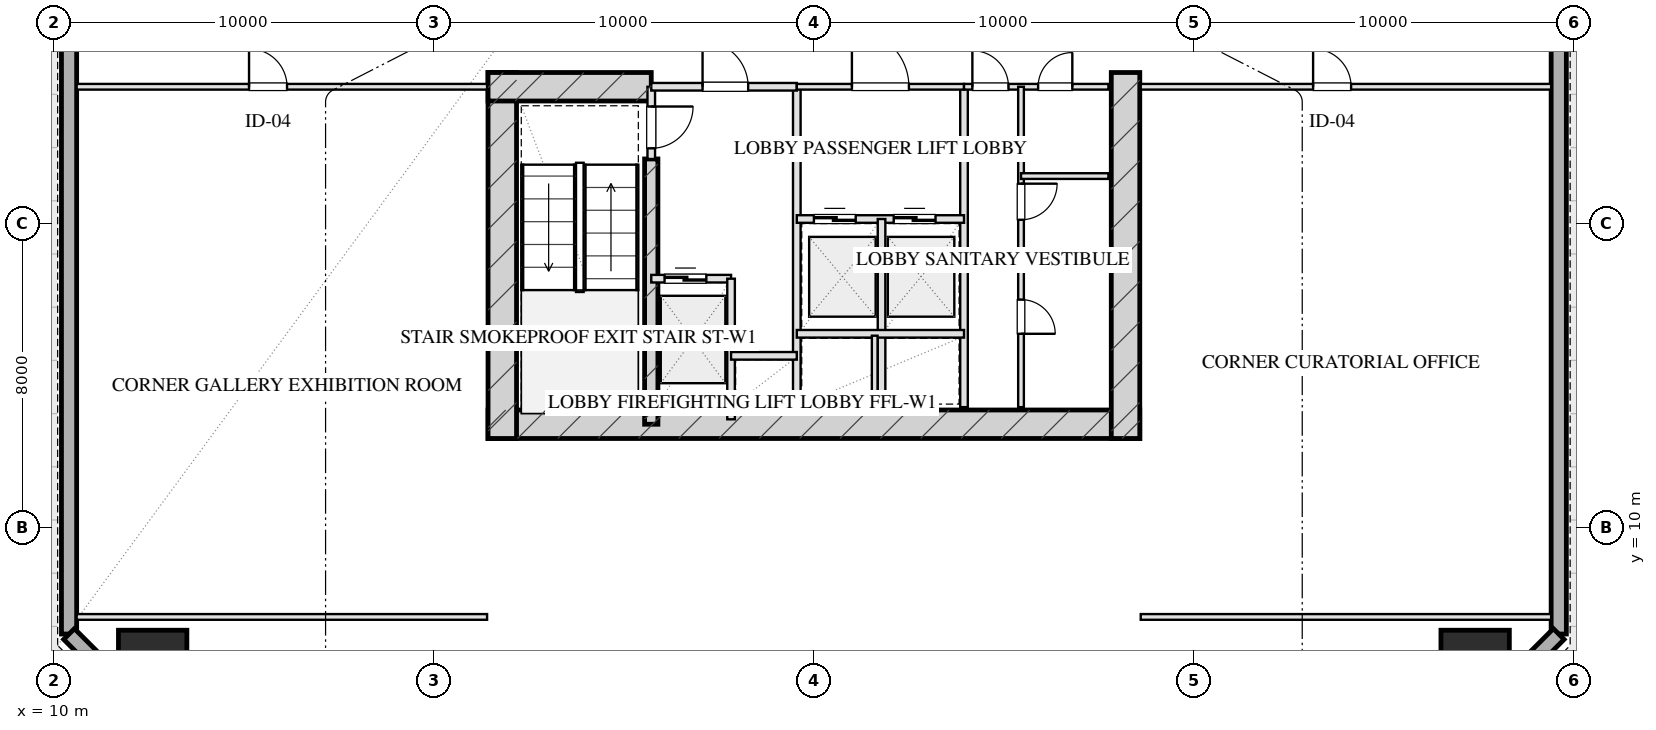
"""IFC4 building model, lengths in metres.
Left out: names, types, materials, properties, quantities, classifications, styles, units other than length and angle.
Written with IfcOpenShell. Run it as: python <this file> out.ifc"""

import sys

from ifc_helpers import new_model, si_unit, direction, frame, frame_2d, origin, origin_2d, place, context, subcontext, project, spatial, rectangle, hollow_rectangle, extrude, element, fill, save


model = new_model("IFC4")
c1 = context("Model", 3, precision=1e-05, world=origin(), true_north=direction((0.0, 1.0)))
c2 = subcontext(c1, "Body", "Model", "MODEL_VIEW")
j1 = project(units=[si_unit("LENGTHUNIT", "METRE"), si_unit("PLANEANGLEUNIT", "RADIAN")], contexts=[c1])
p1 = place(None, origin())
s1 = spatial("IfcSite", under=j1, at=p1, CompositionType="ELEMENT")
p2 = place(p1, origin())
s2 = spatial("IfcBuilding", under=s1, at=p2, CompositionType="ELEMENT")
p3 = place(p2, frame((0.0, 0.0, 26.0)))
s3 = spatial("IfcBuildingStorey", under=s2, at=p3, CompositionType="ELEMENT", Elevation=26.0)
p4 = place(p3, frame((21.425, 12.72, 0.0), z_axis=(0.0, 0.0, 1.0), x_axis=(1.0, 0.0, 0.0)))
e1 = element("IfcWall", 1, at=p4, inside=s3, PredefinedType="SHEAR", context=c2, shape_type="SweptSolid", body=[
    extrude(rectangle(XDim=17.15, YDim=0.75, at=frame_2d((8.575, 0.0))), origin(), (0.0, 0.0, 1.0), 4.0),
])
for number, where, z_axis, x_axis in (
    (2, (21.8, 21.975, 0.0), (0.0, 0.0, 1.0), (0.0, -1.0, 0.0)),
    (3, (38.2, 21.975, 0.0), (0.0, 0.0, 1.0), (0.0, -1.0, 0.0)),
):
    element("IfcWall", number, at=place(p3, frame(where, z_axis=z_axis, x_axis=x_axis)), inside=s3, PredefinedType="SHEAR", context=c2, shape_type="SweptSolid", body=[
        extrude(rectangle(XDim=9.63, YDim=0.75, at=frame_2d((4.815, 0.0))), origin(), (0.0, 0.0, 1.0), 4.0),
    ])
p5 = place(p3, frame((25.72, 19.7, 0.0), z_axis=(0.0, 0.0, 1.0), x_axis=(0.0, -1.0, 0.0)))
e4 = element("IfcWall", 4, at=p5, inside=s3, PredefinedType="SHEAR", context=c2, shape_type="SweptSolid", body=[
    extrude(rectangle(XDim=6.98, YDim=0.35, at=frame_2d((3.49, 0.0))), origin(), (0.0, 0.0, 1.0), 4.0),
])
p6 = place(p3, frame((21.425, 21.6, 0.0), z_axis=(0.0, 0.0, 1.0), x_axis=(1.0, 0.0, 0.0)))
e5 = element("IfcWall", 5, at=p6, inside=s3, PredefinedType="SHEAR", context=c2, shape_type="SweptSolid", body=[
    extrude(rectangle(XDim=4.295, YDim=0.75, at=frame_2d((2.147, 0.0))), origin(), (0.0, 0.0, 1.0), 4.0),
])
for number, where, z_axis, x_axis in (
    (6, (12.6, 6.4, 0.0), (0.0, 0.0, 1.0), (1.0, 0.0, 0.0)),
    (7, (47.4, 6.4, 0.0), (0.0, 0.0, 1.0), (1.0, 0.0, 0.0)),
):
    element("IfcColumn", number, at=place(p3, frame(where, z_axis=z_axis, x_axis=x_axis)), inside=s3, PredefinedType="COLUMN", context=c2, shape_type="SweptSolid", body=[
        extrude(hollow_rectangle(XDim=1.8, YDim=1.8, WallThickness=0.06, at=origin_2d()), origin(), (0.0, 0.0, 1.0), 4.001),
    ])
p7 = place(p3, frame((10.4, 7.2, 0.0), z_axis=(0.0, 0.0, 1.0), x_axis=(0.0, 1.0, 0.0)))
e8 = element("IfcWall", 8, at=p7, inside=s3, PredefinedType="SOLIDWALL", context=c2, shape_type="SweptSolid", body=[
    extrude(rectangle(XDim=53.6, YDim=0.4, at=frame_2d((26.8, 0.0))), origin(), (0.0, 0.0, 1.0), 3.16),
])
p8 = place(p7, frame((22.95, 0.0, 0.75)))
e9 = element("IfcOpeningElement", 9, at=p8, cuts=e8, PredefinedType="OPENING", context=c2, shape_type="SweptSolid", body=[
    extrude(rectangle(XDim=2.5, YDim=1.75, at=frame_2d((1.25, 0.875))), frame((0.0, 0.21, 0.0), z_axis=(0.0, -1.0, 0.0), x_axis=(1.0, 0.0, 0.0)), (0.0, 0.0, 1.0), 0.42),
])
p9 = place(p7, frame((28.15, 0.0, 0.75)))
e10 = element("IfcOpeningElement", 10, at=p9, cuts=e8, PredefinedType="OPENING", context=c2, shape_type="SweptSolid", body=[
    extrude(rectangle(XDim=2.5, YDim=1.75, at=frame_2d((1.25, 0.875))), frame((0.0, 0.21, 0.0), z_axis=(0.0, -1.0, 0.0), x_axis=(1.0, 0.0, 0.0)), (0.0, 0.0, 1.0), 0.42),
])
p10 = place(p3, frame((49.6, 60.8, 0.0), z_axis=(0.0, 0.0, 1.0), x_axis=(0.0, -1.0, 0.0)))
e11 = element("IfcWall", 11, at=p10, inside=s3, PredefinedType="SOLIDWALL", context=c2, shape_type="SweptSolid", body=[
    extrude(rectangle(XDim=53.6, YDim=0.4, at=frame_2d((26.8, 0.0))), origin(), (0.0, 0.0, 1.0), 3.16),
])
p11 = place(p10, frame((28.15, 0.0, 0.75)))
e12 = element("IfcOpeningElement", 12, at=p11, cuts=e11, PredefinedType="OPENING", context=c2, shape_type="SweptSolid", body=[
    extrude(rectangle(XDim=2.5, YDim=1.75, at=frame_2d((1.25, 0.875))), frame((0.0, 0.21, 0.0), z_axis=(0.0, -1.0, 0.0), x_axis=(1.0, 0.0, 0.0)), (0.0, 0.0, 1.0), 0.42),
])
p12 = place(p10, frame((22.95, 0.0, 0.75)))
e13 = element("IfcOpeningElement", 13, at=p12, cuts=e11, PredefinedType="OPENING", context=c2, shape_type="SweptSolid", body=[
    extrude(rectangle(XDim=2.5, YDim=1.75, at=frame_2d((1.25, 0.875))), frame((0.0, 0.21, 0.0), z_axis=(0.0, -1.0, 0.0), x_axis=(1.0, 0.0, 0.0)), (0.0, 0.0, 1.0), 0.42),
])
for number, where, z_axis, x_axis in (
    (14, (49.6, 7.2, 0.0), (0.0, 0.0, 1.0), (-0.707, -0.707, 0.0)),
    (15, (13.4, 4.2, 0.0), (0.0, 0.0, 1.0), (-0.707, 0.707, 0.0)),
):
    element("IfcWall", number, at=place(p3, frame(where, z_axis=z_axis, x_axis=x_axis)), inside=s3, PredefinedType="SOLIDWALL", context=c2, shape_type="SweptSolid", body=[
        extrude(rectangle(XDim=4.243, YDim=0.4, at=frame_2d((2.121, 0.0))), origin(), (0.0, 0.0, 1.0), 3.16),
    ])
p13 = place(p3, frame((25.72, 21.6, 0.0), z_axis=(0.0, 0.0, 1.0), x_axis=(0.0, -1.0, 0.0)))
e16 = element("IfcWall", 16, at=p13, inside=s3, PredefinedType="PARTITIONING", context=c2, shape_type="SweptSolid", body=[
    extrude(rectangle(XDim=1.9, YDim=0.2, at=frame_2d((0.95, 0.0))), origin(), (0.0, 0.0, 1.0), 3.725),
])
p14 = place(p13, frame((0.52, 0.0, 0.0)))
e17 = element("IfcOpeningElement", 17, at=p14, cuts=e16, PredefinedType="OPENING", context=c2, shape_type="SweptSolid", body=[
    extrude(rectangle(XDim=1.1, YDim=2.05, at=frame_2d((0.55, 1.025))), frame((0.0, 0.11, 0.0), z_axis=(0.0, -1.0, 0.0), x_axis=(1.0, 0.0, 0.0)), (0.0, 0.0, 1.0), 0.22),
])
p15 = place(p3, frame((29.55, 21.6, 0.0), z_axis=(0.0, 0.0, 1.0), x_axis=(0.0, -1.0, 0.0)))
e18 = element("IfcWall", 18, at=p15, inside=s3, PredefinedType="PARTITIONING", context=c2, shape_type="SweptSolid", body=[
    extrude(rectangle(XDim=8.43, YDim=0.2, at=frame_2d((4.215, 0.0))), origin(), (0.0, 0.0, 1.0), 3.725),
])
p16 = place(p3, frame((25.72, 21.6, 0.0), z_axis=(0.0, 0.0, 1.0), x_axis=(1.0, 0.0, 0.0)))
e19 = element("IfcWall", 19, at=p16, inside=s3, PredefinedType="PARTITIONING", context=c2, shape_type="SweptSolid", body=[
    extrude(rectangle(XDim=3.83, YDim=0.2, at=frame_2d((1.915, 0.0))), origin(), (0.0, 0.0, 1.0), 3.725),
])
p17 = place(p16, frame((1.35, 0.0, 0.0)))
e20 = element("IfcOpeningElement", 20, at=p17, cuts=e19, PredefinedType="OPENING", context=c2, shape_type="SweptSolid", body=[
    extrude(rectangle(XDim=1.2, YDim=2.05, at=frame_2d((0.6, 1.025))), frame((0.0, 0.11, 0.0), z_axis=(0.0, -1.0, 0.0), x_axis=(1.0, 0.0, 0.0)), (0.0, 0.0, 1.0), 0.22),
])
p18 = place(p3, frame((25.72, 16.55, 0.0), z_axis=(0.0, 0.0, 1.0), x_axis=(1.0, 0.0, 0.0)))
e21 = element("IfcWall", 21, at=p18, inside=s3, PredefinedType="PARTITIONING", context=c2, shape_type="SweptSolid", body=[
    extrude(rectangle(XDim=2.1, YDim=0.2, at=frame_2d((1.05, 0.0))), origin(), (0.0, 0.0, 1.0), 3.725),
])
p19 = place(p18, frame((0.35, 0.0, 0.0)))
e22 = element("IfcOpeningElement", 22, at=p19, cuts=e21, PredefinedType="OPENING", context=c2, shape_type="SweptSolid", body=[
    extrude(rectangle(XDim=1.1, YDim=2.05, at=frame_2d((0.55, 1.025))), frame((0.0, 0.11, 0.0), z_axis=(0.0, -1.0, 0.0), x_axis=(1.0, 0.0, 0.0)), (0.0, 0.0, 1.0), 0.22),
])
p20 = place(p3, frame((27.82, 16.55, 0.0), z_axis=(0.0, 0.0, 1.0), x_axis=(0.0, -1.0, 0.0)))
e23 = element("IfcWall", 23, at=p20, inside=s3, PredefinedType="PARTITIONING", context=c2, shape_type="SweptSolid", body=[
    extrude(rectangle(XDim=3.7, YDim=0.2, at=frame_2d((1.85, 0.0))), origin(), (0.0, 0.0, 1.0), 3.725),
])
p21 = place(p3, frame((27.82, 14.52, 0.0), z_axis=(0.0, 0.0, 1.0), x_axis=(1.0, 0.0, 0.0)))
e24 = element("IfcWall", 24, at=p21, inside=s3, PredefinedType="PARTITIONING", context=c2, shape_type="SweptSolid", body=[
    extrude(rectangle(XDim=1.73, YDim=0.2, at=frame_2d((0.865, 0.0))), origin(), (0.0, 0.0, 1.0), 3.725),
])
p22 = place(p3, frame((33.95, 21.6, 0.0), z_axis=(0.0, 0.0, 1.0), x_axis=(0.0, -1.0, 0.0)))
e25 = element("IfcWall", 25, at=p22, inside=s3, PredefinedType="PARTITIONING", context=c2, shape_type="SweptSolid", body=[
    extrude(rectangle(XDim=8.43, YDim=0.2, at=frame_2d((4.215, 0.0))), origin(), (0.0, 0.0, 1.0), 3.725),
])
p23 = place(p3, frame((29.55, 21.6, 0.0), z_axis=(0.0, 0.0, 1.0), x_axis=(1.0, 0.0, 0.0)))
e26 = element("IfcWall", 26, at=p23, inside=s3, PredefinedType="PARTITIONING", context=c2, shape_type="SweptSolid", body=[
    extrude(rectangle(XDim=4.4, YDim=0.15, at=frame_2d((2.2, 0.0))), origin(), (0.0, 0.0, 1.0), 3.725),
])
p24 = place(p23, frame((1.45, 0.0, 0.0)))
e27 = element("IfcOpeningElement", 27, at=p24, cuts=e26, PredefinedType="OPENING", context=c2, shape_type="SweptSolid", body=[
    extrude(rectangle(XDim=1.5, YDim=2.05, at=frame_2d((0.75, 1.025))), frame((0.0, 0.085, 0.0), z_axis=(0.0, -1.0, 0.0), x_axis=(1.0, 0.0, 0.0)), (0.0, 0.0, 1.0), 0.17),
])
p25 = place(p3, frame((29.55, 18.12, 0.0), z_axis=(0.0, 0.0, 1.0), x_axis=(1.0, 0.0, 0.0)))
e28 = element("IfcWall", 28, at=p25, inside=s3, PredefinedType="PARTITIONING", context=c2, shape_type="SweptSolid", body=[
    extrude(rectangle(XDim=4.4, YDim=0.2, at=frame_2d((2.2, 0.0))), origin(), (0.0, 0.0, 1.0), 3.725),
])
p26 = place(p25, frame((0.45, 0.0, 0.0)))
e29 = element("IfcOpeningElement", 29, at=p26, cuts=e28, PredefinedType="OPENING", context=c2, shape_type="SweptSolid", body=[
    extrude(rectangle(XDim=1.1, YDim=2.05, at=frame_2d((0.55, 1.025))), frame((0.0, 0.11, 0.0), z_axis=(0.0, -1.0, 0.0), x_axis=(1.0, 0.0, 0.0)), (0.0, 0.0, 1.0), 0.22),
])
p27 = place(p25, frame((2.55, 0.0, 0.0)))
e30 = element("IfcOpeningElement", 30, at=p27, cuts=e28, PredefinedType="OPENING", context=c2, shape_type="SweptSolid", body=[
    extrude(rectangle(XDim=1.1, YDim=2.05, at=frame_2d((0.55, 1.025))), frame((0.0, 0.11, 0.0), z_axis=(0.0, -1.0, 0.0), x_axis=(1.0, 0.0, 0.0)), (0.0, 0.0, 1.0), 0.22),
])
p28 = place(p3, frame((31.78, 18.12, 0.0), z_axis=(0.0, 0.0, 1.0), x_axis=(0.0, -1.0, 0.0)))
e31 = element("IfcWall", 31, at=p28, inside=s3, PredefinedType="PARTITIONING", context=c2, shape_type="SweptSolid", body=[
    extrude(rectangle(XDim=4.95, YDim=0.2, at=frame_2d((2.475, 0.0))), origin(), (0.0, 0.0, 1.0), 3.725),
])
p29 = place(p3, frame((29.55, 15.1, 0.0), z_axis=(0.0, 0.0, 1.0), x_axis=(1.0, 0.0, 0.0)))
e32 = element("IfcWall", 32, at=p29, inside=s3, PredefinedType="PARTITIONING", context=c2, shape_type="SweptSolid", body=[
    extrude(rectangle(XDim=4.4, YDim=0.2, at=frame_2d((2.2, 0.0))), origin(), (0.0, 0.0, 1.0), 3.725),
])
p30 = place(p3, frame((31.6, 15.05, 0.0), z_axis=(0.0, 0.0, 1.0), x_axis=(0.0, -1.0, 0.0)))
e33 = element("IfcWall", 33, at=p30, inside=s3, PredefinedType="PARTITIONING", context=c2, shape_type="SweptSolid", body=[
    extrude(rectangle(XDim=1.88, YDim=0.15, at=frame_2d((0.94, 0.0))), origin(), (0.0, 0.0, 1.0), 3.725),
])
p31 = place(p3, frame((33.95, 21.6, 0.0), z_axis=(0.0, 0.0, 1.0), x_axis=(1.0, 0.0, 0.0)))
e34 = element("IfcWall", 34, at=p31, inside=s3, PredefinedType="PARTITIONING", context=c2, shape_type="SweptSolid", body=[
    extrude(rectangle(XDim=3.8, YDim=0.15, at=frame_2d((1.9, 0.0))), origin(), (0.0, 0.0, 1.0), 3.725),
])
p32 = place(p31, frame((0.22, 0.0, 0.0)))
e35 = element("IfcOpeningElement", 35, at=p32, cuts=e34, PredefinedType="OPENING", context=c2, shape_type="SweptSolid", body=[
    extrude(rectangle(XDim=0.95, YDim=2.05, at=frame_2d((0.475, 1.025))), frame((0.0, 0.085, 0.0), z_axis=(0.0, -1.0, 0.0), x_axis=(1.0, 0.0, 0.0)), (0.0, 0.0, 1.0), 0.17),
])
p33 = place(p31, frame((1.95, 0.0, 0.0)))
e36 = element("IfcOpeningElement", 36, at=p33, cuts=e34, PredefinedType="OPENING", context=c2, shape_type="SweptSolid", body=[
    extrude(rectangle(XDim=0.9, YDim=2.05, at=frame_2d((0.45, 1.025))), frame((0.0, 0.085, 0.0), z_axis=(0.0, -1.0, 0.0), x_axis=(1.0, 0.0, 0.0)), (0.0, 0.0, 1.0), 0.17),
])
p34 = place(p3, frame((35.45, 21.6, 0.0), z_axis=(0.0, 0.0, 1.0), x_axis=(0.0, -1.0, 0.0)))
e37 = element("IfcWall", 37, at=p34, inside=s3, PredefinedType="PARTITIONING", context=c2, shape_type="SweptSolid", body=[
    extrude(rectangle(XDim=8.43, YDim=0.15, at=frame_2d((4.215, 0.0))), origin(), (0.0, 0.0, 1.0), 3.365),
])
p35 = place(p34, frame((2.55, 0.0, 0.0)))
e38 = element("IfcOpeningElement", 38, at=p35, cuts=e37, PredefinedType="OPENING", context=c2, shape_type="SweptSolid", body=[
    extrude(rectangle(XDim=0.95, YDim=2.05, at=frame_2d((0.475, 1.025))), frame((0.0, 0.085, 0.0), z_axis=(0.0, -1.0, 0.0), x_axis=(1.0, 0.0, 0.0)), (0.0, 0.0, 1.0), 0.17),
])
p36 = place(p34, frame((5.6, 0.0, 0.0)))
e39 = element("IfcOpeningElement", 39, at=p36, cuts=e37, PredefinedType="OPENING", context=c2, shape_type="SweptSolid", body=[
    extrude(rectangle(XDim=0.9, YDim=2.05, at=frame_2d((0.45, 1.025))), frame((0.0, 0.085, 0.0), z_axis=(0.0, -1.0, 0.0), x_axis=(1.0, 0.0, 0.0)), (0.0, 0.0, 1.0), 0.17),
])
for number, where, z_axis, x_axis in (
    (40, (35.45, 17.2, 0.0), (0.0, 0.0, 1.0), (1.0, 0.0, 0.0)),
    (41, (35.45, 19.25, 0.0), (0.0, 0.0, 1.0), (1.0, 0.0, 0.0)),
):
    element("IfcWall", number, at=place(p3, frame(where, z_axis=z_axis, x_axis=x_axis)), inside=s3, PredefinedType="PARTITIONING", context=c2, shape_type="SweptSolid", body=[
        extrude(rectangle(XDim=2.3, YDim=0.15, at=frame_2d((1.15, 0.0))), origin(), (0.0, 0.0, 1.0), 3.725),
    ])
p37 = place(p3, frame((10.6, 7.65, 0.0), z_axis=(0.0, 0.0, 1.0), x_axis=(1.0, 0.0, 0.0)))
e42 = element("IfcWall", 42, at=p37, inside=s3, PredefinedType="PARTITIONING", context=c2, shape_type="SweptSolid", body=[
    extrude(rectangle(XDim=10.8, YDim=0.15, at=frame_2d((5.4, 0.0))), origin(), (0.0, 0.0, 1.0), 3.725),
])
p38 = place(p3, frame((10.6, 21.6, 0.0), z_axis=(0.0, 0.0, 1.0), x_axis=(1.0, 0.0, 0.0)))
e43 = element("IfcWall", 43, at=p38, inside=s3, PredefinedType="PARTITIONING", context=c2, shape_type="SweptSolid", body=[
    extrude(rectangle(XDim=10.8, YDim=0.15, at=frame_2d((5.4, 0.0))), origin(), (0.0, 0.0, 1.0), 3.725),
])
p39 = place(p38, frame((4.536, 0.0, 0.0)))
e44 = element("IfcOpeningElement", 44, at=p39, cuts=e43, PredefinedType="OPENING", context=c2, shape_type="SweptSolid", body=[
    extrude(rectangle(XDim=1.0, YDim=2.05, at=frame_2d((0.5, 1.025))), frame((0.0, 0.085, 0.0), z_axis=(0.0, -1.0, 0.0), x_axis=(1.0, 0.0, 0.0)), (0.0, 0.0, 1.0), 0.17),
])
p40 = place(p3, frame((38.6, 7.65, 0.0), z_axis=(0.0, 0.0, 1.0), x_axis=(1.0, 0.0, 0.0)))
e45 = element("IfcWall", 45, at=p40, inside=s3, PredefinedType="PARTITIONING", context=c2, shape_type="SweptSolid", body=[
    extrude(rectangle(XDim=10.8, YDim=0.15, at=frame_2d((5.4, 0.0))), origin(), (0.0, 0.0, 1.0), 3.725),
])
p41 = place(p3, frame((38.6, 21.6, 0.0), z_axis=(0.0, 0.0, 1.0), x_axis=(1.0, 0.0, 0.0)))
e46 = element("IfcWall", 46, at=p41, inside=s3, PredefinedType="PARTITIONING", context=c2, shape_type="SweptSolid", body=[
    extrude(rectangle(XDim=10.8, YDim=0.15, at=frame_2d((5.4, 0.0))), origin(), (0.0, 0.0, 1.0), 3.725),
])
p42 = place(p41, frame((4.536, 0.0, 0.0)))
e47 = element("IfcOpeningElement", 47, at=p42, cuts=e46, PredefinedType="OPENING", context=c2, shape_type="SweptSolid", body=[
    extrude(rectangle(XDim=1.0, YDim=2.05, at=frame_2d((0.5, 1.025))), frame((0.0, 0.085, 0.0), z_axis=(0.0, -1.0, 0.0), x_axis=(1.0, 0.0, 0.0)), (0.0, 0.0, 1.0), 0.17),
])
p43 = place(p14, origin())
e48 = element("IfcDoor", 48, at=p43, inside=s3, OperationType="SINGLE_SWING_LEFT", PredefinedType="DOOR", context=c2, shape_type="SweptSolid", body=[
    extrude(rectangle(XDim=1.1, YDim=2.05, at=frame_2d((0.55, 1.025))), frame((0.0, 0.025, 0.0), z_axis=(0.0, -1.0, 0.0), x_axis=(1.0, 0.0, 0.0)), (0.0, 0.0, 1.0), 0.05),
])
fill(e17, e48)
p44 = place(p17, origin())
e49 = element("IfcDoor", 49, at=p44, inside=s3, OperationType="SINGLE_SWING_LEFT", PredefinedType="DOOR", context=c2, shape_type="SweptSolid", body=[
    extrude(rectangle(XDim=1.2, YDim=2.05, at=frame_2d((0.6, 1.025))), frame((0.0, 0.025, 0.0), z_axis=(0.0, -1.0, 0.0), x_axis=(1.0, 0.0, 0.0)), (0.0, 0.0, 1.0), 0.05),
])
fill(e20, e49)
p45 = place(p19, origin())
e50 = element("IfcDoor", 50, at=p45, inside=s3, OperationType="DOUBLE_DOOR_SLIDING", PredefinedType="DOOR", context=c2, shape_type="SweptSolid", body=[
    extrude(rectangle(XDim=1.1, YDim=2.05, at=frame_2d((0.55, 1.025))), frame((0.0, 0.025, 0.0), z_axis=(0.0, -1.0, 0.0), x_axis=(1.0, 0.0, 0.0)), (0.0, 0.0, 1.0), 0.05),
])
fill(e22, e50)
p46 = place(p24, origin())
e51 = element("IfcDoor", 51, at=p46, inside=s3, OperationType="SINGLE_SWING_LEFT", PredefinedType="DOOR", context=c2, shape_type="SweptSolid", body=[
    extrude(rectangle(XDim=1.5, YDim=2.05, at=frame_2d((0.75, 1.025))), frame((0.0, 0.025, 0.0), z_axis=(0.0, -1.0, 0.0), x_axis=(1.0, 0.0, 0.0)), (0.0, 0.0, 1.0), 0.05),
])
fill(e27, e51)
p47 = place(p26, origin())
e52 = element("IfcDoor", 52, at=p47, inside=s3, OperationType="DOUBLE_DOOR_SLIDING", PredefinedType="DOOR", context=c2, shape_type="SweptSolid", body=[
    extrude(rectangle(XDim=1.1, YDim=2.05, at=frame_2d((0.55, 1.025))), frame((0.0, 0.025, 0.0), z_axis=(0.0, -1.0, 0.0), x_axis=(1.0, 0.0, 0.0)), (0.0, 0.0, 1.0), 0.05),
])
fill(e29, e52)
p48 = place(p27, origin())
e53 = element("IfcDoor", 53, at=p48, inside=s3, OperationType="DOUBLE_DOOR_SLIDING", PredefinedType="DOOR", context=c2, shape_type="SweptSolid", body=[
    extrude(rectangle(XDim=1.1, YDim=2.05, at=frame_2d((0.55, 1.025))), frame((0.0, 0.025, 0.0), z_axis=(0.0, -1.0, 0.0), x_axis=(1.0, 0.0, 0.0)), (0.0, 0.0, 1.0), 0.05),
])
fill(e30, e53)
p49 = place(p32, origin())
e54 = element("IfcDoor", 54, at=p49, inside=s3, OperationType="SINGLE_SWING_LEFT", PredefinedType="DOOR", context=c2, shape_type="SweptSolid", body=[
    extrude(rectangle(XDim=0.95, YDim=2.05, at=frame_2d((0.475, 1.025))), frame((0.0, 0.025, 0.0), z_axis=(0.0, -1.0, 0.0), x_axis=(1.0, 0.0, 0.0)), (0.0, 0.0, 1.0), 0.05),
])
fill(e35, e54)
p50 = place(p33, origin())
e55 = element("IfcDoor", 55, at=p50, inside=s3, OperationType="SINGLE_SWING_RIGHT", PredefinedType="DOOR", context=c2, shape_type="SweptSolid", body=[
    extrude(rectangle(XDim=0.9, YDim=2.05, at=frame_2d((0.45, 1.025))), frame((0.0, 0.025, 0.0), z_axis=(0.0, -1.0, 0.0), x_axis=(1.0, 0.0, 0.0)), (0.0, 0.0, 1.0), 0.05),
])
fill(e36, e55)
p51 = place(p35, origin())
e56 = element("IfcDoor", 56, at=p51, inside=s3, OperationType="SINGLE_SWING_LEFT", PredefinedType="DOOR", context=c2, shape_type="SweptSolid", body=[
    extrude(rectangle(XDim=0.95, YDim=2.05, at=frame_2d((0.475, 1.025))), frame((0.0, 0.025, 0.0), z_axis=(0.0, -1.0, 0.0), x_axis=(1.0, 0.0, 0.0)), (0.0, 0.0, 1.0), 0.05),
])
fill(e38, e56)
p52 = place(p36, origin())
e57 = element("IfcDoor", 57, at=p52, inside=s3, OperationType="SINGLE_SWING_RIGHT", PredefinedType="DOOR", context=c2, shape_type="SweptSolid", body=[
    extrude(rectangle(XDim=0.9, YDim=2.05, at=frame_2d((0.45, 1.025))), frame((0.0, 0.025, 0.0), z_axis=(0.0, -1.0, 0.0), x_axis=(1.0, 0.0, 0.0)), (0.0, 0.0, 1.0), 0.05),
])
fill(e39, e57)
p53 = place(p39, origin())
e58 = element("IfcDoor", 58, at=p53, inside=s3, OperationType="SINGLE_SWING_LEFT", PredefinedType="DOOR", context=c2, shape_type="SweptSolid", body=[
    extrude(rectangle(XDim=1.0, YDim=2.05, at=frame_2d((0.5, 1.025))), frame((0.0, 0.025, 0.0), z_axis=(0.0, -1.0, 0.0), x_axis=(1.0, 0.0, 0.0)), (0.0, 0.0, 1.0), 0.05),
])
fill(e44, e58)
p54 = place(p42, origin())
e59 = element("IfcDoor", 59, at=p54, inside=s3, OperationType="SINGLE_SWING_LEFT", PredefinedType="DOOR", context=c2, shape_type="SweptSolid", body=[
    extrude(rectangle(XDim=1.0, YDim=2.05, at=frame_2d((0.5, 1.025))), frame((0.0, 0.025, 0.0), z_axis=(0.0, -1.0, 0.0), x_axis=(1.0, 0.0, 0.0)), (0.0, 0.0, 1.0), 0.05),
])
fill(e47, e59)
save(model, sys.argv[1])
